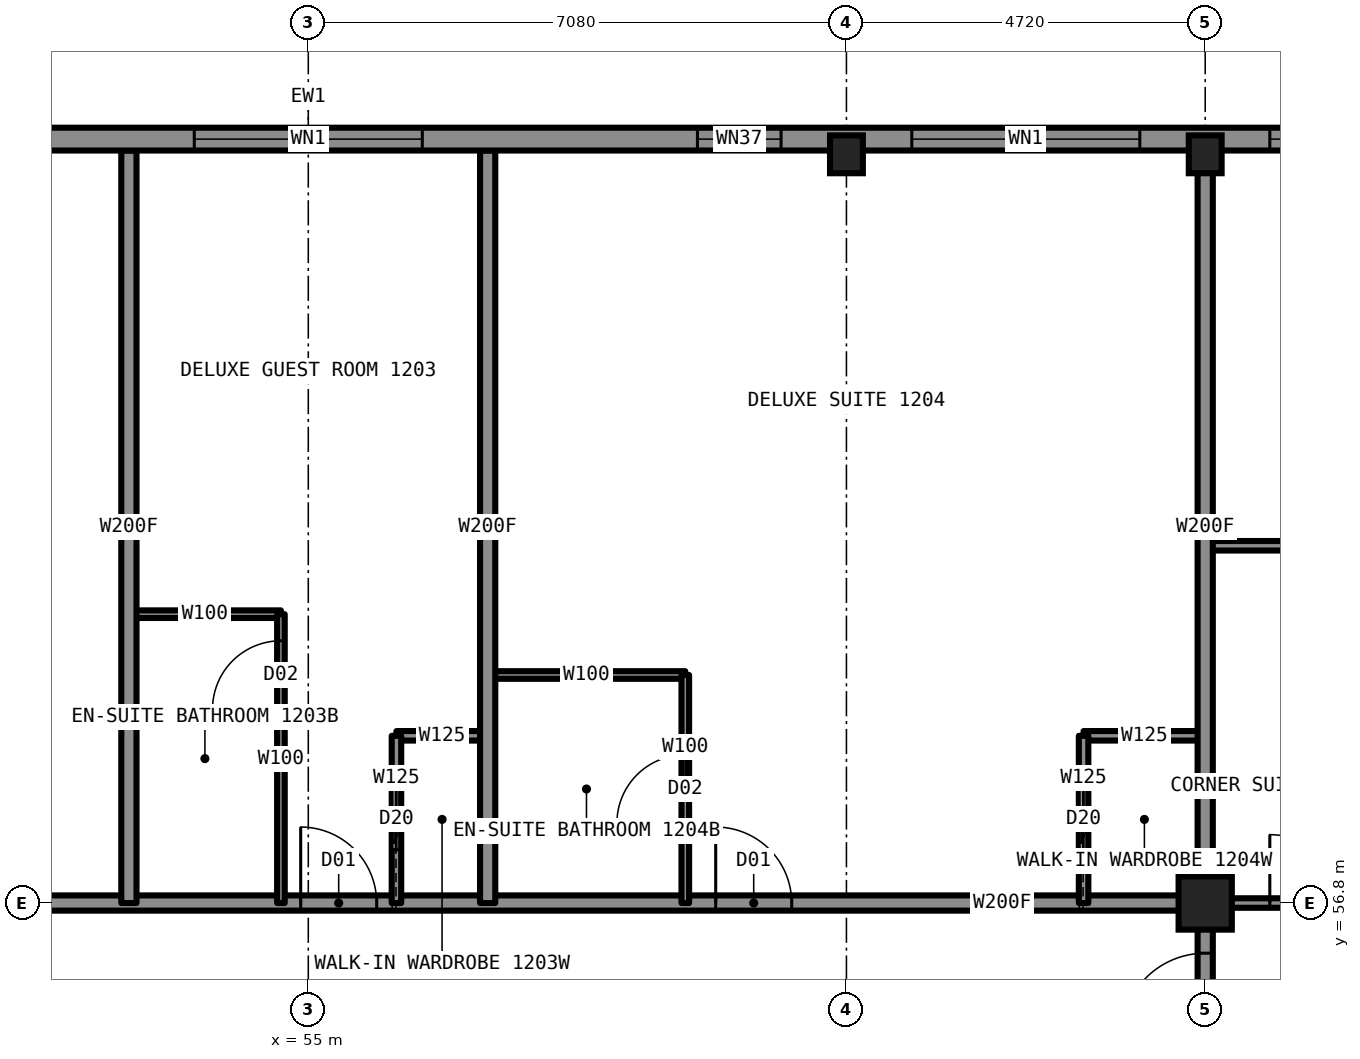
"""IFC4 building model, lengths in metres.
Left out: names, types, materials, properties, quantities, classifications, styles, units other than length and angle.
Written with IfcOpenShell. Run it as: python <this file> out.ifc"""

import sys

from ifc_helpers import new_model, si_unit, direction, frame, frame_2d, origin, origin_2d, place, context, subcontext, project, spatial, rectangle, hollow_rectangle, i_section, extrude, element, fill, save


model = new_model("IFC4")
c1 = context("Model", 3, precision=1e-05, world=origin(), true_north=direction((0.0, 1.0)))
c2 = subcontext(c1, "Body", "Model", "MODEL_VIEW")
j1 = project(units=[si_unit("LENGTHUNIT", "METRE"), si_unit("PLANEANGLEUNIT", "RADIAN")], contexts=[c1])
p1 = place(None, origin())
s1 = spatial("IfcSite", under=j1, at=p1, CompositionType="ELEMENT")
p2 = place(p1, origin())
s2 = spatial("IfcBuilding", under=s1, at=p2, CompositionType="ELEMENT")
p3 = place(p2, frame((0.0, 0.0, 49.5)))
s3 = spatial("IfcBuildingStorey", under=s2, at=p3, CompositionType="ELEMENT", Elevation=49.5)
for number, where, z_axis, x_axis in (
    (1, (62.08, 66.65, 0.0), (0.0, 0.0, 1.0), (1.0, 0.0, 0.0)),
    (2, (66.8, 66.65, 0.0), (0.0, 0.0, 1.0), (1.0, 0.0, 0.0)),
):
    element("IfcColumn", number, at=place(p3, frame(where, z_axis=z_axis, x_axis=x_axis)), inside=s3, PredefinedType="COLUMN", context=c2, shape_type="SweptSolid", body=[
        extrude(i_section(OverallWidth=0.432, OverallDepth=0.498, WebThickness=0.056, FlangeThickness=0.089, at=origin_2d()), origin(), (0.0, 0.0, 1.0), 3.5),
    ])
p4 = place(p3, frame((66.8, 56.8, 0.0), z_axis=(0.0, 0.0, 1.0), x_axis=(1.0, 0.0, 0.0)))
e3 = element("IfcColumn", 3, at=p4, inside=s3, PredefinedType="COLUMN", context=c2, shape_type="SweptSolid", body=[
    extrude(hollow_rectangle(XDim=0.7, YDim=0.7, WallThickness=0.06, at=origin_2d()), origin(), (0.0, 0.0, 1.0), 3.5),
])
p5 = place(p3, frame((43.2, 56.8, 0.0), z_axis=(0.0, 0.0, 1.0), x_axis=(1.0, 0.0, 0.0)))
e4 = element("IfcWall", 4, at=p5, inside=s3, PredefinedType="PARTITIONING", context=c2, shape_type="SweptSolid", body=[
    extrude(rectangle(XDim=23.6, YDim=0.2, at=frame_2d((11.8, 0.0))), origin(), (0.0, 0.0, 1.0), 3.33),
])
p6 = place(p5, frame((1.46, 0.0, 0.0)))
e5 = element("IfcOpeningElement", 5, at=p6, cuts=e4, PredefinedType="OPENING", context=c2, shape_type="SweptSolid", body=[
    extrude(rectangle(XDim=1.0, YDim=2.2, at=frame_2d((0.5, 1.1))), frame((0.0, 0.11, 0.0), z_axis=(0.0, -1.0, 0.0), x_axis=(1.0, 0.0, 0.0)), (0.0, 0.0, 1.0), 0.22),
])
p7 = place(p5, frame((7.27, 0.0, 0.0)))
e6 = element("IfcOpeningElement", 6, at=p7, cuts=e4, PredefinedType="OPENING", context=c2, shape_type="SweptSolid", body=[
    extrude(rectangle(XDim=1.0, YDim=2.2, at=frame_2d((0.5, 1.1))), frame((0.0, 0.11, 0.0), z_axis=(0.0, -1.0, 0.0), x_axis=(1.0, 0.0, 0.0)), (0.0, 0.0, 1.0), 0.22),
])
p8 = place(p5, frame((11.7, 0.0, 0.0)))
e7 = element("IfcOpeningElement", 7, at=p8, cuts=e4, PredefinedType="OPENING", context=c2, shape_type="SweptSolid", body=[
    extrude(rectangle(XDim=1.0, YDim=2.2, at=frame_2d((0.5, 1.1))), frame((0.0, 0.11, 0.0), z_axis=(0.0, -1.0, 0.0), x_axis=(1.0, 0.0, 0.0)), (0.0, 0.0, 1.0), 0.22),
])
p9 = place(p5, frame((17.16, 0.0, 0.0)))
e8 = element("IfcOpeningElement", 8, at=p9, cuts=e4, PredefinedType="OPENING", context=c2, shape_type="SweptSolid", body=[
    extrude(rectangle(XDim=1.0, YDim=2.2, at=frame_2d((0.5, 1.1))), frame((0.0, 0.11, 0.0), z_axis=(0.0, -1.0, 0.0), x_axis=(1.0, 0.0, 0.0)), (0.0, 0.0, 1.0), 0.22),
])
p10 = place(p3, frame((66.8, 56.8, 0.0), z_axis=(0.0, 0.0, 1.0), x_axis=(1.0, 0.0, 0.0)))
e9 = element("IfcWall", 9, at=p10, inside=s3, PredefinedType="PARTITIONING", context=c2, shape_type="SweptSolid", body=[
    extrude(rectangle(XDim=9.9, YDim=0.125, at=frame_2d((4.95, 0.0))), origin(), (0.0, 0.0, 1.0), 2.573),
])
p11 = place(p10, frame((0.85, 0.0, 0.0)))
e10 = element("IfcOpeningElement", 10, at=p11, cuts=e9, PredefinedType="OPENING", context=c2, shape_type="SweptSolid", body=[
    extrude(rectangle(XDim=0.9, YDim=2.2, at=frame_2d((0.45, 1.1))), frame((0.0, 0.073, 0.0), z_axis=(0.0, -1.0, 0.0), x_axis=(1.0, 0.0, 0.0)), (0.0, 0.0, 1.0), 0.145),
])
p12 = place(p3, frame((56.16, 59.0, 0.0), z_axis=(0.0, 0.0, 1.0), x_axis=(1.0, 0.0, 0.0)))
e11 = element("IfcWall", 11, at=p12, inside=s3, PredefinedType="PARTITIONING", context=c2, shape_type="SweptSolid", body=[
    extrude(rectangle(XDim=1.2, YDim=0.125, at=frame_2d((0.6, 0.0))), origin(), (0.0, 0.0, 1.0), 3.33),
])
p13 = place(p3, frame((65.2, 59.0, 0.0), z_axis=(0.0, 0.0, 1.0), x_axis=(1.0, 0.0, 0.0)))
e12 = element("IfcWall", 12, at=p13, inside=s3, PredefinedType="PARTITIONING", context=c2, shape_type="SweptSolid", body=[
    extrude(rectangle(XDim=1.6, YDim=0.125, at=frame_2d((0.8, 0.0))), origin(), (0.0, 0.0, 1.0), 3.33),
])
p14 = place(p3, frame((57.36, 59.8, 0.0), z_axis=(0.0, 0.0, 1.0), x_axis=(1.0, 0.0, 0.0)))
e13 = element("IfcWall", 13, at=p14, inside=s3, PredefinedType="PARTITIONING", context=c2, shape_type="SweptSolid", body=[
    extrude(rectangle(XDim=2.6, YDim=0.1, at=frame_2d((1.3, 0.0))), origin(), (0.0, 0.0, 1.0), 3.33),
])
p15 = place(p3, frame((52.64, 60.6, 0.0), z_axis=(0.0, 0.0, 1.0), x_axis=(1.0, 0.0, 0.0)))
e14 = element("IfcWall", 14, at=p15, inside=s3, PredefinedType="PARTITIONING", context=c2, shape_type="SweptSolid", body=[
    extrude(rectangle(XDim=2.0, YDim=0.1, at=frame_2d((1.0, 0.0))), origin(), (0.0, 0.0, 1.0), 3.33),
])
p16 = place(p3, frame((66.8, 61.5, 0.0), z_axis=(0.0, 0.0, 1.0), x_axis=(1.0, 0.0, 0.0)))
e15 = element("IfcWall", 15, at=p16, inside=s3, PredefinedType="PARTITIONING", context=c2, shape_type="SweptSolid", body=[
    extrude(rectangle(XDim=9.894, YDim=0.125, at=frame_2d((4.947, 0.0))), origin(), (0.0, 0.0, 1.0), 3.33),
])
p17 = place(p16, frame((1.75, 0.0, 0.0)))
e16 = element("IfcOpeningElement", 16, at=p17, cuts=e15, PredefinedType="OPENING", context=c2, shape_type="SweptSolid", body=[
    extrude(rectangle(XDim=0.9, YDim=2.2, at=frame_2d((0.45, 1.1))), frame((0.0, 0.073, 0.0), z_axis=(0.0, -1.0, 0.0), x_axis=(1.0, 0.0, 0.0)), (0.0, 0.0, 1.0), 0.145),
])
p18 = place(p3, frame((54.64, 56.8, 0.0), z_axis=(0.0, 0.0, 1.0), x_axis=(0.0, 1.0, 0.0)))
e17 = element("IfcWall", 17, at=p18, inside=s3, PredefinedType="PARTITIONING", context=c2, shape_type="SweptSolid", body=[
    extrude(rectangle(XDim=3.8, YDim=0.1, at=frame_2d((1.9, 0.0))), origin(), (0.0, 0.0, 1.0), 3.33),
])
p19 = place(p18, frame((2.55, 0.0, 0.0)))
e18 = element("IfcOpeningElement", 18, at=p19, cuts=e17, PredefinedType="OPENING", context=c2, shape_type="SweptSolid", body=[
    extrude(rectangle(XDim=0.9, YDim=2.1, at=frame_2d((0.45, 1.05))), frame((0.0, 0.06, 0.0), z_axis=(0.0, -1.0, 0.0), x_axis=(1.0, 0.0, 0.0)), (0.0, 0.0, 1.0), 0.12),
])
p20 = place(p3, frame((52.64, 56.8, 0.0), z_axis=(0.0, 0.0, 1.0), x_axis=(0.0, 1.0, 0.0)))
e19 = element("IfcWall", 19, at=p20, inside=s3, PredefinedType="PARTITIONING", context=c2, shape_type="SweptSolid", body=[
    extrude(rectangle(XDim=9.9, YDim=0.2, at=frame_2d((4.95, 0.0))), origin(), (0.0, 0.0, 1.0), 3.33),
])
p21 = place(p3, frame((56.16, 56.8, 0.0), z_axis=(0.0, 0.0, 1.0), x_axis=(0.0, 1.0, 0.0)))
e20 = element("IfcWall", 20, at=p21, inside=s3, PredefinedType="PARTITIONING", context=c2, shape_type="SweptSolid", body=[
    extrude(rectangle(XDim=2.2, YDim=0.125, at=frame_2d((1.1, 0.0))), origin(), (0.0, 0.0, 1.0), 3.33),
])
p22 = place(p21, frame((0.7, 0.0, 0.0)))
e21 = element("IfcOpeningElement", 21, at=p22, cuts=e20, PredefinedType="OPENING", context=c2, shape_type="SweptSolid", body=[
    extrude(rectangle(XDim=0.8, YDim=2.1, at=frame_2d((0.4, 1.05))), frame((0.0, 0.073, 0.0), z_axis=(0.0, -1.0, 0.0), x_axis=(1.0, 0.0, 0.0)), (0.0, 0.0, 1.0), 0.145),
])
p23 = place(p3, frame((65.2, 56.8, 0.0), z_axis=(0.0, 0.0, 1.0), x_axis=(0.0, 1.0, 0.0)))
e22 = element("IfcWall", 22, at=p23, inside=s3, PredefinedType="PARTITIONING", context=c2, shape_type="SweptSolid", body=[
    extrude(rectangle(XDim=2.2, YDim=0.125, at=frame_2d((1.1, 0.0))), origin(), (0.0, 0.0, 1.0), 3.33),
])
p24 = place(p23, frame((0.7, 0.0, 0.0)))
e23 = element("IfcOpeningElement", 23, at=p24, cuts=e22, PredefinedType="OPENING", context=c2, shape_type="SweptSolid", body=[
    extrude(rectangle(XDim=0.8, YDim=2.1, at=frame_2d((0.4, 1.05))), frame((0.0, 0.073, 0.0), z_axis=(0.0, -1.0, 0.0), x_axis=(1.0, 0.0, 0.0)), (0.0, 0.0, 1.0), 0.145),
])
p25 = place(p3, frame((66.8, 52.08, 0.0), z_axis=(0.0, 0.0, 1.0), x_axis=(0.0, 1.0, 0.0)))
e24 = element("IfcWall", 24, at=p25, inside=s3, PredefinedType="PARTITIONING", context=c2, shape_type="SweptSolid", body=[
    extrude(rectangle(XDim=4.72, YDim=0.2, at=frame_2d((2.36, 0.0))), origin(), (0.0, 0.0, 1.0), 3.33),
])
p26 = place(p25, frame((2.96, 0.0, 0.0)))
e25 = element("IfcOpeningElement", 25, at=p26, cuts=e24, PredefinedType="OPENING", context=c2, shape_type="SweptSolid", body=[
    extrude(rectangle(XDim=1.1, YDim=2.2, at=frame_2d((0.55, 1.1))), frame((0.0, 0.11, 0.0), z_axis=(0.0, -1.0, 0.0), x_axis=(1.0, 0.0, 0.0)), (0.0, 0.0, 1.0), 0.22),
])
p27 = place(p3, frame((66.8, 56.8, 0.0), z_axis=(0.0, 0.0, 1.0), x_axis=(0.0, 1.0, 0.0)))
e26 = element("IfcWall", 26, at=p27, inside=s3, PredefinedType="PARTITIONING", context=c2, shape_type="SweptSolid", body=[
    extrude(rectangle(XDim=9.9, YDim=0.2, at=frame_2d((4.95, 0.0))), origin(), (0.0, 0.0, 1.0), 2.573),
])
p28 = place(p3, frame((57.36, 56.8, 0.0), z_axis=(0.0, 0.0, 1.0), x_axis=(0.0, 1.0, 0.0)))
e27 = element("IfcWall", 27, at=p28, inside=s3, PredefinedType="PARTITIONING", context=c2, shape_type="SweptSolid", body=[
    extrude(rectangle(XDim=9.9, YDim=0.2, at=frame_2d((4.95, 0.0))), origin(), (0.0, 0.0, 1.0), 3.33),
])
p29 = place(p3, frame((59.96, 56.8, 0.0), z_axis=(0.0, 0.0, 1.0), x_axis=(0.0, 1.0, 0.0)))
e28 = element("IfcWall", 28, at=p29, inside=s3, PredefinedType="PARTITIONING", context=c2, shape_type="SweptSolid", body=[
    extrude(rectangle(XDim=3.0, YDim=0.1, at=frame_2d((1.5, 0.0))), origin(), (0.0, 0.0, 1.0), 3.33),
])
p30 = place(p29, frame((1.05, 0.0, 0.0)))
e29 = element("IfcOpeningElement", 29, at=p30, cuts=e28, PredefinedType="OPENING", context=c2, shape_type="SweptSolid", body=[
    extrude(rectangle(XDim=0.9, YDim=2.1, at=frame_2d((0.45, 1.05))), frame((0.0, 0.06, 0.0), z_axis=(0.0, -1.0, 0.0), x_axis=(1.0, 0.0, 0.0)), (0.0, 0.0, 1.0), 0.12),
])
p31 = place(p3, frame((71.5, 66.85, 0.0), z_axis=(0.0, 0.0, 1.0), x_axis=(-1.0, 0.0, 0.0)))
e30 = element("IfcWall", 30, at=p31, inside=s3, PredefinedType="SOLIDWALL", context=c2, shape_type="SweptSolid", body=[
    extrude(rectangle(XDim=33.0, YDim=0.3, at=frame_2d((16.5, 0.0))), origin(), (0.0, 0.0, 1.0), 2.83),
])
p32 = place(p31, frame((0.85, 0.0, 0.5)))
e31 = element("IfcOpeningElement", 31, at=p32, cuts=e30, PredefinedType="OPENING", context=c2, shape_type="SweptSolid", body=[
    extrude(rectangle(XDim=3.0, YDim=2.0, at=frame_2d((1.5, 1.0))), frame((0.0, 0.16, 0.0), z_axis=(0.0, -1.0, 0.0), x_axis=(1.0, 0.0, 0.0)), (0.0, 0.0, 1.0), 0.32),
])
p33 = place(p31, frame((5.56, 0.0, 0.5)))
e32 = element("IfcOpeningElement", 32, at=p33, cuts=e30, PredefinedType="OPENING", context=c2, shape_type="SweptSolid", body=[
    extrude(rectangle(XDim=3.0, YDim=2.0, at=frame_2d((1.5, 1.0))), frame((0.0, 0.16, 0.0), z_axis=(0.0, -1.0, 0.0), x_axis=(1.0, 0.0, 0.0)), (0.0, 0.0, 1.0), 0.32),
])
p34 = place(p31, frame((10.28, 0.0, 1.1)))
e33 = element("IfcOpeningElement", 33, at=p34, cuts=e30, PredefinedType="OPENING", context=c2, shape_type="SweptSolid", body=[
    extrude(rectangle(XDim=1.1, YDim=1.4, at=frame_2d((0.55, 0.7))), frame((0.0, 0.16, 0.0), z_axis=(0.0, -1.0, 0.0), x_axis=(1.0, 0.0, 0.0)), (0.0, 0.0, 1.0), 0.32),
])
p35 = place(p31, frame((15.0, 0.0, 0.5)))
e34 = element("IfcOpeningElement", 34, at=p35, cuts=e30, PredefinedType="OPENING", context=c2, shape_type="SweptSolid", body=[
    extrude(rectangle(XDim=3.0, YDim=2.0, at=frame_2d((1.5, 1.0))), frame((0.0, 0.16, 0.0), z_axis=(0.0, -1.0, 0.0), x_axis=(1.0, 0.0, 0.0)), (0.0, 0.0, 1.0), 0.32),
])
p36 = place(p31, frame((21.62, 0.0, 1.1)))
e35 = element("IfcOpeningElement", 35, at=p36, cuts=e30, PredefinedType="OPENING", context=c2, shape_type="SweptSolid", body=[
    extrude(rectangle(XDim=1.1, YDim=1.4, at=frame_2d((0.55, 0.7))), frame((0.0, 0.16, 0.0), z_axis=(0.0, -1.0, 0.0), x_axis=(1.0, 0.0, 0.0)), (0.0, 0.0, 1.0), 0.32),
])
p37 = place(p31, frame((24.44, 0.0, 0.5)))
e36 = element("IfcOpeningElement", 36, at=p37, cuts=e30, PredefinedType="OPENING", context=c2, shape_type="SweptSolid", body=[
    extrude(rectangle(XDim=3.0, YDim=2.0, at=frame_2d((1.5, 1.0))), frame((0.0, 0.16, 0.0), z_axis=(0.0, -1.0, 0.0), x_axis=(1.0, 0.0, 0.0)), (0.0, 0.0, 1.0), 0.32),
])
p38 = place(p31, frame((29.15, 0.0, 0.5)))
e37 = element("IfcOpeningElement", 37, at=p38, cuts=e30, PredefinedType="OPENING", context=c2, shape_type="SweptSolid", body=[
    extrude(rectangle(XDim=3.0, YDim=2.0, at=frame_2d((1.5, 1.0))), frame((0.0, 0.16, 0.0), z_axis=(0.0, -1.0, 0.0), x_axis=(1.0, 0.0, 0.0)), (0.0, 0.0, 1.0), 0.32),
])
p39 = place(p8, origin())
e38 = element("IfcDoor", 38, at=p39, inside=s3, OperationType="SINGLE_SWING_LEFT", PredefinedType="DOOR", context=c2, shape_type="SweptSolid", body=[
    extrude(rectangle(XDim=1.0, YDim=2.2, at=frame_2d((0.5, 1.1))), frame((0.0, 0.025, 0.0), z_axis=(0.0, -1.0, 0.0), x_axis=(1.0, 0.0, 0.0)), (0.0, 0.0, 1.0), 0.05),
])
fill(e7, e38)
p40 = place(p19, origin())
e39 = element("IfcDoor", 39, at=p40, inside=s3, OperationType="SINGLE_SWING_RIGHT", PredefinedType="DOOR", context=c2, shape_type="SweptSolid", body=[
    extrude(rectangle(XDim=0.9, YDim=2.1, at=frame_2d((0.45, 1.05))), frame((0.0, 0.025, 0.0), z_axis=(0.0, -1.0, 0.0), x_axis=(1.0, 0.0, 0.0)), (0.0, 0.0, 1.0), 0.05),
])
fill(e18, e39)
p41 = place(p22, origin())
e40 = element("IfcDoor", 40, at=p41, inside=s3, OperationType="SLIDING_TO_LEFT", PredefinedType="DOOR", context=c2, shape_type="SweptSolid", body=[
    extrude(rectangle(XDim=0.8, YDim=2.1, at=frame_2d((0.4, 1.05))), frame((0.0, 0.025, 0.0), z_axis=(0.0, -1.0, 0.0), x_axis=(1.0, 0.0, 0.0)), (0.0, 0.0, 1.0), 0.05),
])
fill(e21, e40)
p42 = place(p9, origin())
e41 = element("IfcDoor", 41, at=p42, inside=s3, OperationType="SINGLE_SWING_LEFT", PredefinedType="DOOR", context=c2, shape_type="SweptSolid", body=[
    extrude(rectangle(XDim=1.0, YDim=2.2, at=frame_2d((0.5, 1.1))), frame((0.0, 0.025, 0.0), z_axis=(0.0, -1.0, 0.0), x_axis=(1.0, 0.0, 0.0)), (0.0, 0.0, 1.0), 0.05),
])
fill(e8, e41)
p43 = place(p30, origin())
e42 = element("IfcDoor", 42, at=p43, inside=s3, OperationType="SINGLE_SWING_RIGHT", PredefinedType="DOOR", context=c2, shape_type="SweptSolid", body=[
    extrude(rectangle(XDim=0.9, YDim=2.1, at=frame_2d((0.45, 1.05))), frame((0.0, 0.025, 0.0), z_axis=(0.0, -1.0, 0.0), x_axis=(1.0, 0.0, 0.0)), (0.0, 0.0, 1.0), 0.05),
])
fill(e29, e42)
p44 = place(p24, origin())
e43 = element("IfcDoor", 43, at=p44, inside=s3, OperationType="SLIDING_TO_LEFT", PredefinedType="DOOR", context=c2, shape_type="SweptSolid", body=[
    extrude(rectangle(XDim=0.8, YDim=2.1, at=frame_2d((0.4, 1.05))), frame((0.0, 0.025, 0.0), z_axis=(0.0, -1.0, 0.0), x_axis=(1.0, 0.0, 0.0)), (0.0, 0.0, 1.0), 0.05),
])
fill(e23, e43)
p45 = place(p11, origin())
e44 = element("IfcDoor", 44, at=p45, inside=s3, OperationType="SINGLE_SWING_LEFT", PredefinedType="DOOR", context=c2, shape_type="SweptSolid", body=[
    extrude(rectangle(XDim=0.9, YDim=2.2, at=frame_2d((0.45, 1.1))), frame((0.0, 0.025, 0.0), z_axis=(0.0, -1.0, 0.0), x_axis=(1.0, 0.0, 0.0)), (0.0, 0.0, 1.0), 0.05),
])
fill(e10, e44)
p46 = place(p26, origin())
e45 = element("IfcDoor", 45, at=p46, inside=s3, OperationType="SINGLE_SWING_LEFT", PredefinedType="DOOR", context=c2, shape_type="SweptSolid", body=[
    extrude(rectangle(XDim=1.1, YDim=2.2, at=frame_2d((0.55, 1.1))), frame((0.0, 0.025, 0.0), z_axis=(0.0, -1.0, 0.0), x_axis=(1.0, 0.0, 0.0)), (0.0, 0.0, 1.0), 0.05),
])
fill(e25, e45)
p47 = place(p32, origin())
e46 = element("IfcWindow", 46, at=p47, inside=s3, PartitioningType="SINGLE_PANEL", PredefinedType="WINDOW", context=c2, shape_type="SweptSolid", body=[
    extrude(rectangle(XDim=3.0, YDim=2.0, at=frame_2d((1.5, 1.0))), frame((0.0, 0.03, 0.0), z_axis=(0.0, -1.0, 0.0), x_axis=(1.0, 0.0, 0.0)), (0.0, 0.0, 1.0), 0.06),
])
fill(e31, e46)
p48 = place(p33, origin())
e47 = element("IfcWindow", 47, at=p48, inside=s3, PartitioningType="SINGLE_PANEL", PredefinedType="WINDOW", context=c2, shape_type="SweptSolid", body=[
    extrude(rectangle(XDim=3.0, YDim=2.0, at=frame_2d((1.5, 1.0))), frame((0.0, 0.03, 0.0), z_axis=(0.0, -1.0, 0.0), x_axis=(1.0, 0.0, 0.0)), (0.0, 0.0, 1.0), 0.06),
])
fill(e32, e47)
p49 = place(p34, origin())
e48 = element("IfcWindow", 48, at=p49, inside=s3, PartitioningType="SINGLE_PANEL", PredefinedType="WINDOW", context=c2, shape_type="SweptSolid", body=[
    extrude(rectangle(XDim=1.1, YDim=1.4, at=frame_2d((0.55, 0.7))), frame((0.0, 0.03, 0.0), z_axis=(0.0, -1.0, 0.0), x_axis=(1.0, 0.0, 0.0)), (0.0, 0.0, 1.0), 0.06),
])
fill(e33, e48)
p50 = place(p35, origin())
e49 = element("IfcWindow", 49, at=p50, inside=s3, PartitioningType="SINGLE_PANEL", PredefinedType="WINDOW", context=c2, shape_type="SweptSolid", body=[
    extrude(rectangle(XDim=3.0, YDim=2.0, at=frame_2d((1.5, 1.0))), frame((0.0, 0.03, 0.0), z_axis=(0.0, -1.0, 0.0), x_axis=(1.0, 0.0, 0.0)), (0.0, 0.0, 1.0), 0.06),
])
fill(e34, e49)
save(model, sys.argv[1])
